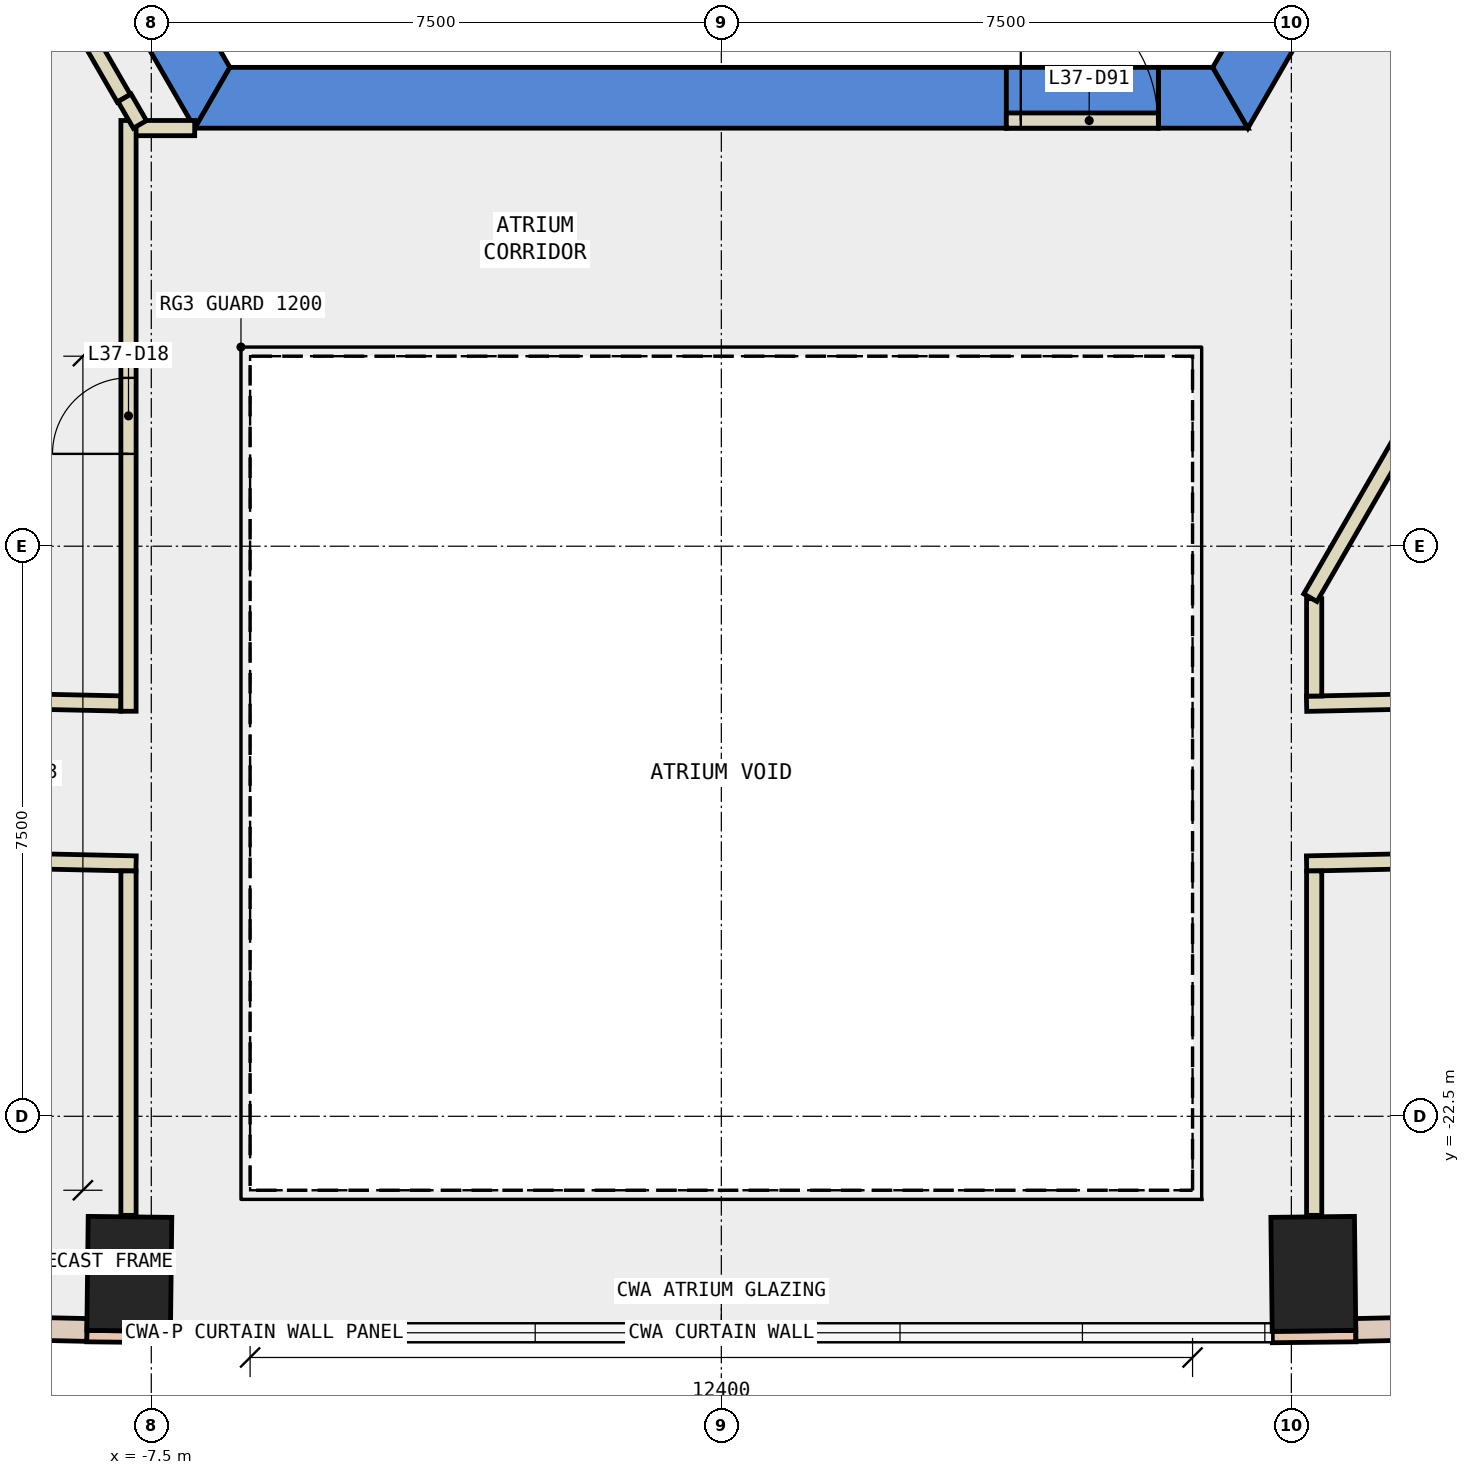
"""IFC4 building model, lengths in metres.
Left out: names, types, materials, properties, quantities, classifications, styles, units other than length and angle.
Written with IfcOpenShell. Run it as: python <this file> out.ifc"""

import sys

from ifc_helpers import new_model, si_unit, direction, frame, frame_2d, origin, origin_2d, place, context, subcontext, project, spatial, polyline, rectangle, outline, extrude, element, fill, save


model = new_model("IFC4")
c1 = context("Model", 3, precision=1e-05, world=origin(), true_north=direction((0.0, 1.0)))
c2 = subcontext(c1, "Body", "Model", "MODEL_VIEW")
j1 = project(units=[si_unit("LENGTHUNIT", "METRE"), si_unit("PLANEANGLEUNIT", "RADIAN")], contexts=[c1])
p1 = place(None, origin())
s1 = spatial("IfcSite", under=j1, at=p1, CompositionType="ELEMENT")
p2 = place(p1, origin())
s2 = spatial("IfcBuilding", under=s1, at=p2, CompositionType="ELEMENT")
p3 = place(p2, frame((0.0, 0.0, 167.6)))
s3 = spatial("IfcBuildingStorey", under=s2, at=p3, CompositionType="ELEMENT", Elevation=167.6)
for number, where, z_axis, x_axis in (
    (1, (-7.789, -24.573, -0.4), (0.0, 0.0, 1.0), (-1.0, 0.012, 0.0)),
    (2, (7.789, -24.573, -0.4), (0.0, 0.0, 1.0), (1.0, 0.012, 0.0)),
):
    element("IfcColumn", number, at=place(p3, frame(where, z_axis=z_axis, x_axis=x_axis)), inside=s3, PredefinedType="COLUMN", context=c2, shape_type="SweptSolid", body=[
        extrude(rectangle(XDim=1.1, YDim=1.5, at=origin_2d()), origin(), (0.0, 0.0, 1.0), 4.2),
    ])
p4 = place(p3, frame((0.0, 0.0, -0.4)))
e3 = element("IfcWall", 3, at=p4, inside=s3, PredefinedType="SHEAR", context=c2, shape_type="SweptSolid", body=[
    extrude(outline(polyline([(-13.856, 2.5), (-6.928, -9.5), (-6.466, -8.7), (-12.933, 2.5), (-13.856, 2.5)])), origin(), (0.0, 0.0, 1.0), 4.2),
])
p5 = place(p3, frame((0.0, 0.0, -0.4)))
e4 = element("IfcWall", 4, at=p5, inside=s3, PredefinedType="SHEAR", context=c2, shape_type="SweptSolid", body=[
    extrude(outline(polyline([(3.75, -9.5), (3.75, -8.7), (-6.466, -8.7), (-6.928, -9.5), (3.75, -9.5)])), origin(), (0.0, 0.0, 1.0), 4.2),
])
p6 = place(p3, frame((0.0, 0.0, -0.4)))
e5 = element("IfcWall", 5, at=p6, inside=s3, PredefinedType="SHEAR", context=c2, shape_type="SweptSolid", body=[
    extrude(outline(polyline([(5.75, -8.7), (5.75, -9.5), (6.928, -9.5), (6.466, -8.7), (5.75, -8.7)])), origin(), (0.0, 0.0, 1.0), 4.2),
])
p7 = place(p3, frame((0.0, 0.0, 3.6)))
e6 = element("IfcWall", 6, at=p7, inside=s3, PredefinedType="SHEAR", context=c2, shape_type="SweptSolid", body=[
    extrude(outline(polyline([(5.75, -9.5), (5.75, -8.7), (3.75, -8.7), (3.75, -9.5), (5.75, -9.5)])), origin(), (0.0, 0.0, 1.0), 0.2),
])
p8 = place(p3, frame((0.0, 0.0, -0.4)))
e7 = element("IfcWall", 7, at=p8, inside=s3, PredefinedType="SHEAR", context=c2, shape_type="SweptSolid", body=[
    extrude(outline(polyline([(8.117, -7.44), (7.424, -7.04), (6.466, -8.7), (6.928, -9.5), (8.117, -7.44)])), origin(), (0.0, 0.0, 1.0), 4.2),
])
for number, where, z_axis, x_axis in (
    (8, (-8.349, -25.392, 0.0), (0.0, 0.0, 1.0), (1.0, -0.011, 0.0)),
    (9, (7.249, -25.404, 0.0), (0.0, 0.0, 1.0), (1.0, 0.011, 0.0)),
):
    element("IfcWall", number, at=place(p3, frame(where, z_axis=z_axis, x_axis=x_axis)), inside=s3, PredefinedType="STANDARD", context=c2, shape_type="SweptSolid", body=[
        extrude(rectangle(XDim=1.1, YDim=0.15, at=frame_2d((0.55, 0.0))), origin(), (0.0, 0.0, 1.0), 3.8),
    ])
p9 = place(p3, frame((-15.68, -25.152, 0.0), z_axis=(0.0, 0.0, 1.0), x_axis=(0.999765201774, -0.021668902196, 0.0)))
e10 = element("IfcWall", 10, at=p9, inside=s3, PredefinedType="STANDARD", context=c2, shape_type="SweptSolid", body=[
    extrude(rectangle(XDim=7.335, YDim=0.3, at=frame_2d((3.667, 0.0))), origin(), (0.0, 0.0, 1.0), 3.8),
])
p10 = place(p9, frame((0.634, 0.0, 0.9)))
e11 = element("IfcOpeningElement", 11, at=p10, cuts=e10, PredefinedType="OPENING", context=c2, shape_type="SweptSolid", body=[
    extrude(rectangle(XDim=2.4, YDim=2.6, at=frame_2d((1.2, 1.3))), frame((0.0, 0.16, 0.0), z_axis=(0.0, -1.0, 0.0), x_axis=(1.0, 0.0, 0.0)), (0.0, 0.0, 1.0), 0.32),
])
p11 = place(p9, frame((4.301, 0.0, 0.9)))
e12 = element("IfcOpeningElement", 12, at=p11, cuts=e10, PredefinedType="OPENING", context=c2, shape_type="SweptSolid", body=[
    extrude(rectangle(XDim=2.4, YDim=2.6, at=frame_2d((1.2, 1.3))), frame((0.0, 0.16, 0.0), z_axis=(0.0, -1.0, 0.0), x_axis=(1.0, 0.0, 0.0)), (0.0, 0.0, 1.0), 0.32),
])
p12 = place(p3, frame((8.347, -25.311, 0.0), z_axis=(0.0, 0.0, 1.0), x_axis=(0.999765201774, 0.021668902196, 0.0)))
e13 = element("IfcWall", 13, at=p12, inside=s3, PredefinedType="STANDARD", context=c2, shape_type="SweptSolid", body=[
    extrude(rectangle(XDim=7.335, YDim=0.3, at=frame_2d((3.667, 0.0))), origin(), (0.0, 0.0, 1.0), 3.8),
])
p13 = place(p12, frame((0.634, 0.0, 0.9)))
e14 = element("IfcOpeningElement", 14, at=p13, cuts=e13, PredefinedType="OPENING", context=c2, shape_type="SweptSolid", body=[
    extrude(rectangle(XDim=2.4, YDim=2.6, at=frame_2d((1.2, 1.3))), frame((0.0, 0.16, 0.0), z_axis=(0.0, -1.0, 0.0), x_axis=(1.0, 0.0, 0.0)), (0.0, 0.0, 1.0), 0.32),
])
p14 = place(p12, frame((4.301, 0.0, 0.9)))
e15 = element("IfcOpeningElement", 15, at=p14, cuts=e13, PredefinedType="OPENING", context=c2, shape_type="SweptSolid", body=[
    extrude(rectangle(XDim=2.4, YDim=2.6, at=frame_2d((1.2, 1.3))), frame((0.0, 0.16, 0.0), z_axis=(0.0, -1.0, 0.0), x_axis=(1.0, 0.0, 0.0)), (0.0, 0.0, 1.0), 0.32),
])
p15 = place(p3, frame((7.7, -17.073, 0.0), z_axis=(0.0, 0.0, 1.0), x_axis=(0.999764372799, 0.021707115919, 0.0)))
e16 = element("IfcWall", 16, at=p15, inside=s3, PredefinedType="PARTITIONING", context=c2, shape_type="SweptSolid", body=[
    extrude(rectangle(XDim=8.289, YDim=0.2, at=frame_2d((4.145, 0.0))), origin(), (0.0, 0.0, 1.0), 3.8),
])
p16 = place(p15, frame((3.245, 0.0, 0.0)))
e17 = element("IfcOpeningElement", 17, at=p16, cuts=e16, PredefinedType="OPENING", context=c2, shape_type="SweptSolid", body=[
    extrude(rectangle(XDim=1.8, YDim=2.1, at=frame_2d((0.9, 1.05))), frame((0.0, 0.11, 0.0), z_axis=(0.0, -1.0, 0.0), x_axis=(1.0, 0.0, 0.0)), (0.0, 0.0, 1.0), 0.22),
])
p17 = place(p3, frame((-11.278, -16.996, 0.0), z_axis=(0.0, 0.0, 1.0), x_axis=(0.999766613119, -0.021603687022, 0.0)))
e18 = element("IfcWall", 18, at=p17, inside=s3, PredefinedType="PARTITIONING", context=c2, shape_type="SweptSolid", body=[
    extrude(rectangle(XDim=3.379, YDim=0.2, at=frame_2d((1.689, 0.0))), origin(), (0.0, 0.0, 1.0), 3.8),
])
p18 = place(p3, frame((16.049, -18.992, 0.0), z_axis=(0.0, 0.0, 1.0), x_axis=(-0.999762156504, -0.021808952826, 0.0)))
e19 = element("IfcWall", 19, at=p18, inside=s3, PredefinedType="PARTITIONING", context=c2, shape_type="SweptSolid", body=[
    extrude(rectangle(XDim=8.351, YDim=0.2, at=frame_2d((4.176, 0.0))), origin(), (0.0, 0.0, 1.0), 3.8),
])
p19 = place(p18, frame((3.675, 0.0, 0.0)))
e20 = element("IfcOpeningElement", 20, at=p19, cuts=e19, PredefinedType="OPENING", context=c2, shape_type="SweptSolid", body=[
    extrude(rectangle(XDim=1.0, YDim=2.1, at=frame_2d((0.5, 1.05))), frame((0.0, 0.11, 0.0), z_axis=(0.0, -1.0, 0.0), x_axis=(1.0, 0.0, 0.0)), (0.0, 0.0, 1.0), 0.22),
])
p20 = place(p3, frame((-7.7, -19.174, 0.0), z_axis=(0.0, 0.0, 1.0), x_axis=(-0.999762993889, 0.02177053169, 0.0)))
e21 = element("IfcWall", 21, at=p20, inside=s3, PredefinedType="PARTITIONING", context=c2, shape_type="SweptSolid", body=[
    extrude(rectangle(XDim=8.276, YDim=0.2, at=frame_2d((4.138, 0.0))), origin(), (0.0, 0.0, 1.0), 3.8),
])
p21 = place(p20, frame((3.713, 0.0, 0.0)))
e22 = element("IfcOpeningElement", 22, at=p21, cuts=e21, PredefinedType="OPENING", context=c2, shape_type="SweptSolid", body=[
    extrude(rectangle(XDim=1.0, YDim=2.1, at=frame_2d((0.5, 1.05))), frame((0.0, 0.11, 0.0), z_axis=(0.0, -1.0, 0.0), x_axis=(1.0, 0.0, 0.0)), (0.0, 0.0, 1.0), 0.22),
])
p22 = place(p3, frame((7.8, -15.69, 0.0), z_axis=(0.0, 0.0, 1.0), x_axis=(0.0, -1.0, 0.0)))
e23 = element("IfcWall", 23, at=p22, inside=s3, PredefinedType="PARTITIONING", context=c2, shape_type="SweptSolid", body=[
    extrude(rectangle(XDim=1.281, YDim=0.2, at=frame_2d((0.641, 0.0))), origin(), (0.0, 0.0, 1.0), 3.8),
])
p23 = place(p3, frame((-7.722, -9.499, 0.0), z_axis=(0.0, 0.0, 1.0), x_axis=(1.0, 0.0, 0.0)))
e24 = element("IfcWall", 24, at=p23, inside=s3, PredefinedType="PARTITIONING", context=c2, shape_type="SweptSolid", body=[
    extrude(rectangle(XDim=0.793, YDim=0.2, at=frame_2d((0.396, 0.0))), origin(), (0.0, 0.0, 1.0), 3.8),
])
p24 = place(p3, frame((-7.8, -17.171, 0.0), z_axis=(0.0, 0.0, 1.0), x_axis=(0.0, 1.0, 0.0)))
e25 = element("IfcWall", 25, at=p24, inside=s3, PredefinedType="PARTITIONING", context=c2, shape_type="SweptSolid", body=[
    extrude(rectangle(XDim=7.772, YDim=0.2, at=frame_2d((3.886, 0.0))), origin(), (0.0, 0.0, 1.0), 3.8),
])
p25 = place(p24, frame((3.386, 0.0, 0.0)))
e26 = element("IfcOpeningElement", 26, at=p25, cuts=e25, PredefinedType="OPENING", context=c2, shape_type="SweptSolid", body=[
    extrude(rectangle(XDim=1.0, YDim=2.1, at=frame_2d((0.5, 1.05))), frame((0.0, 0.11, 0.0), z_axis=(0.0, -1.0, 0.0), x_axis=(1.0, 0.0, 0.0)), (0.0, 0.0, 1.0), 0.22),
])
for number, where, z_axis, x_axis in (
    (27, (7.8, -19.272, 0.0), (0.0, 0.0, 1.0), (0.0, -1.0, 0.0)),
    (28, (-7.8, -23.803, 0.0), (0.0, 0.0, 1.0), (0.0, 1.0, 0.0)),
):
    element("IfcWall", number, at=place(p3, frame(where, z_axis=z_axis, x_axis=x_axis)), inside=s3, PredefinedType="PARTITIONING", context=c2, shape_type="SweptSolid", body=[
        extrude(rectangle(XDim=4.531, YDim=0.2, at=frame_2d((2.266, 0.0))), origin(), (0.0, 0.0, 1.0), 3.8),
    ])
p26 = place(p3, frame((-7.862, -9.107, 0.0), z_axis=(0.0, 0.0, 1.0), x_axis=(-0.499994038704, 0.866028845513, 0.0)))
e29 = element("IfcWall", 29, at=p26, inside=s3, PredefinedType="PARTITIONING", context=c2, shape_type="SweptSolid", body=[
    extrude(rectangle(XDim=2.568, YDim=0.2, at=frame_2d((1.284, 0.0))), origin(), (0.0, 0.0, 1.0), 3.8),
])
p27 = place(p3, frame((-7.65, -9.451, 0.0), z_axis=(0.0, 0.0, 1.0), x_axis=(-0.500297731093, 0.865853440406, 0.0)))
e30 = element("IfcWall", 30, at=p27, inside=s3, PredefinedType="PARTITIONING", context=c2, shape_type="SweptSolid", body=[
    extrude(rectangle(XDim=0.404, YDim=0.2, at=frame_2d((0.202, 0.0))), origin(), (0.0, 0.0, 1.0), 3.8),
])
p28 = place(p3, frame((3.75, -9.4, 0.0), z_axis=(0.0, 0.0, 1.0), x_axis=(1.0, 0.0, 0.0)))
e31 = element("IfcWall", 31, at=p28, inside=s3, PredefinedType="PARTITIONING", context=c2, shape_type="SweptSolid", body=[
    extrude(rectangle(XDim=2.0, YDim=0.2, at=frame_2d((1.0, 0.0))), origin(), (0.0, 0.0, 1.0), 2.4),
])
p29 = place(p28, frame((0.19, 0.0, 0.0)))
e32 = element("IfcOpeningElement", 32, at=p29, cuts=e31, PredefinedType="OPENING", context=c2, shape_type="SweptSolid", body=[
    extrude(rectangle(XDim=1.8, YDim=2.1, at=frame_2d((0.9, 1.05))), frame((0.0, 0.11, 0.0), z_axis=(0.0, -1.0, 0.0), x_axis=(1.0, 0.0, 0.0)), (0.0, 0.0, 1.0), 0.22),
])
p30 = place(p3, frame((12.401, -7.621, 0.0), z_axis=(0.0, 0.0, 1.0), x_axis=(-0.499983724212, -0.866034800411, 0.0)))
e33 = element("IfcWall", 33, at=p30, inside=s3, PredefinedType="PARTITIONING", context=c2, shape_type="SweptSolid", body=[
    extrude(rectangle(XDim=9.302, YDim=0.2, at=frame_2d((4.651, 0.0))), origin(), (0.0, 0.0, 1.0), 3.8),
])
p31 = place(p25, origin())
e34 = element("IfcDoor", 34, at=p31, inside=s3, OperationType="SINGLE_SWING_LEFT", PredefinedType="DOOR", context=c2, shape_type="SweptSolid", body=[
    extrude(rectangle(XDim=1.0, YDim=2.1, at=frame_2d((0.5, 1.05))), frame((0.0, 0.025, 0.0), z_axis=(0.0, -1.0, 0.0), x_axis=(1.0, 0.0, 0.0)), (0.0, 0.0, 1.0), 0.05),
])
fill(e26, e34)
p32 = place(p29, origin())
e35 = element("IfcDoor", 35, at=p32, inside=s3, OperationType="DOUBLE_DOOR_SINGLE_SWING", PredefinedType="DOOR", context=c2, shape_type="SweptSolid", body=[
    extrude(rectangle(XDim=1.8, YDim=2.1, at=frame_2d((0.9, 1.05))), frame((0.0, 0.025, 0.0), z_axis=(0.0, -1.0, 0.0), x_axis=(1.0, 0.0, 0.0)), (0.0, 0.0, 1.0), 0.05),
])
fill(e32, e35)
save(model, sys.argv[1])
